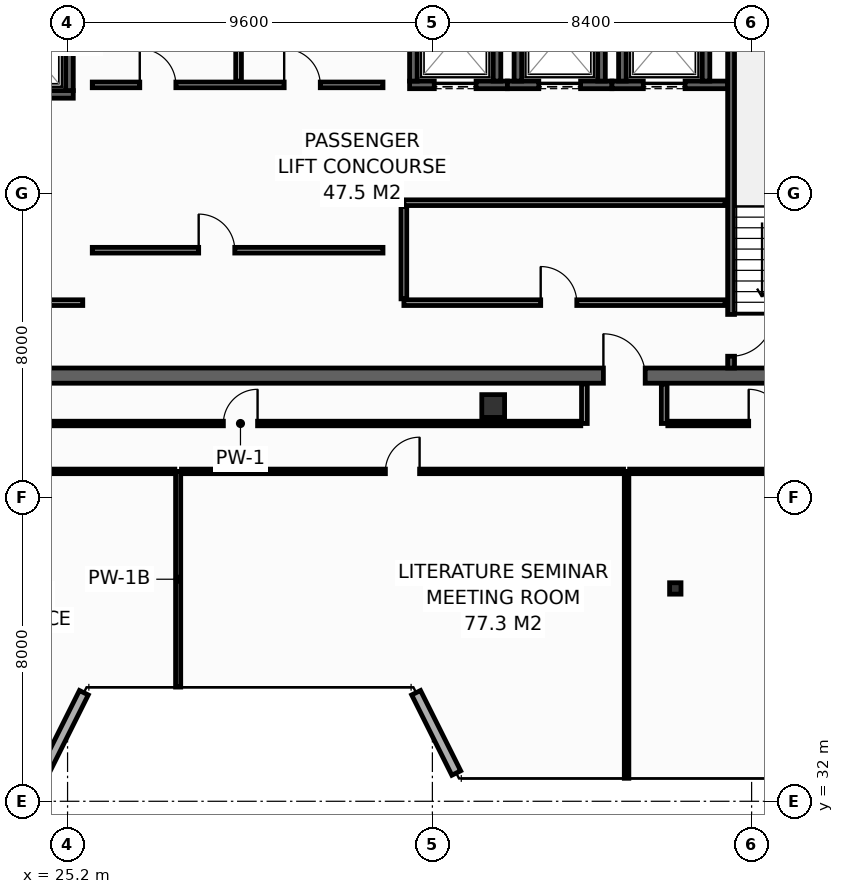
"""IFC4 building model, lengths in metres.
Left out: names, types, materials, properties, quantities, classifications, styles, units other than length and angle.
Written with IfcOpenShell. Run it as: python <this file> out.ifc"""

import sys

from ifc_helpers import new_model, si_unit, direction, frame, frame_2d, origin, origin_2d, place, context, subcontext, project, spatial, rectangle, hollow_rectangle, extrude, element, fill, save


model = new_model("IFC4")
c1 = context("Model", 3, precision=1e-05, world=origin(), true_north=direction((0.0, 1.0)))
c2 = subcontext(c1, "Body", "Model", "MODEL_VIEW")
j1 = project(units=[si_unit("LENGTHUNIT", "METRE"), si_unit("PLANEANGLEUNIT", "RADIAN")], contexts=[c1])
p1 = place(None, origin())
s1 = spatial("IfcSite", under=j1, at=p1, CompositionType="ELEMENT")
p2 = place(p1, origin())
s2 = spatial("IfcBuilding", under=s1, at=p2, CompositionType="ELEMENT")
p3 = place(p2, frame((0.0, 0.0, 302.8)))
s3 = spatial("IfcBuildingStorey", under=s2, at=p3, CompositionType="ELEMENT", Elevation=302.8)
p4 = place(p3, frame((13.7, 43.2, 0.0), z_axis=(0.0, 0.0, 1.0), x_axis=(1.0, 0.0, 0.0)))
e1 = element("IfcWall", 1, at=p4, inside=s3, PredefinedType="SHEAR", context=c2, shape_type="SweptSolid", body=[
    extrude(rectangle(XDim=32.5, YDim=0.4, at=frame_2d((16.25, 0.0))), origin(), (0.0, 0.0, 1.0), 3.55),
])
p5 = place(p4, frame((5.4, 0.0, 0.0)))
e2 = element("IfcOpeningElement", 2, at=p5, cuts=e1, PredefinedType="OPENING", context=c2, shape_type="SweptSolid", body=[
    extrude(rectangle(XDim=1.1, YDim=2.15, at=frame_2d((0.55, 1.075))), frame((0.0, 0.21, 0.0), z_axis=(0.0, -1.0, 0.0), x_axis=(1.0, 0.0, 0.0)), (0.0, 0.0, 1.0), 0.42),
])
p6 = place(p4, frame((25.6, 0.0, 0.0)))
e3 = element("IfcOpeningElement", 3, at=p6, cuts=e1, PredefinedType="OPENING", context=c2, shape_type="SweptSolid", body=[
    extrude(rectangle(XDim=1.1, YDim=2.15, at=frame_2d((0.55, 1.075))), frame((0.0, 0.21, 0.0), z_axis=(0.0, -1.0, 0.0), x_axis=(1.0, 0.0, 0.0)), (0.0, 0.0, 1.0), 0.42),
])
p7 = place(p3, frame((36.4, 42.4, 0.0), z_axis=(0.0, 0.0, 1.0), x_axis=(1.0, 0.0, 0.0)))
e4 = element("IfcColumn", 4, at=p7, inside=s3, PredefinedType="COLUMN", context=c2, shape_type="SweptSolid", body=[
    extrude(hollow_rectangle(XDim=0.6, YDim=0.6, WallThickness=0.028, at=origin_2d()), origin(), (0.0, 0.0, 1.0), 3.8),
])
p8 = place(p3, frame((41.192, 37.6, 0.0), z_axis=(0.0, 0.0, 1.0), x_axis=(1.0, 0.0, 0.0)))
e5 = element("IfcColumn", 5, at=p8, inside=s3, PredefinedType="COLUMN", context=c2, shape_type="SweptSolid", body=[
    extrude(hollow_rectangle(XDim=0.3, YDim=0.3, WallThickness=0.012, at=origin_2d()), origin(), (0.0, 0.0, 1.0), 3.8),
])
p9 = place(p3, frame((22.5, 50.6, 0.0), z_axis=(0.0, 0.0, 1.0), x_axis=(1.0, 0.0, 0.0)))
e6 = element("IfcWall", 6, at=p9, inside=s3, PredefinedType="SHEAR", context=c2, shape_type="SweptSolid", body=[
    extrude(rectangle(XDim=2.85, YDim=0.2, at=frame_2d((1.425, 0.0))), origin(), (0.0, 0.0, 1.0), 3.55),
])
p10 = place(p9, frame((0.925, 0.0, 0.0)))
e7 = element("IfcOpeningElement", 7, at=p10, cuts=e6, PredefinedType="OPENING", context=c2, shape_type="SweptSolid", body=[
    extrude(rectangle(XDim=1.25, YDim=2.3, at=frame_2d((0.625, 1.15))), frame((0.0, 0.11, 0.0), z_axis=(0.0, -1.0, 0.0), x_axis=(1.0, 0.0, 0.0)), (0.0, 0.0, 1.0), 0.22),
])
p11 = place(p3, frame((25.25, 50.7, 0.0), z_axis=(0.0, 0.0, 1.0), x_axis=(0.0, 1.0, 0.0)))
e8 = element("IfcWall", 8, at=p11, inside=s3, PredefinedType="SHEAR", context=c2, shape_type="SweptSolid", body=[
    extrude(rectangle(XDim=2.6, YDim=0.2, at=frame_2d((1.3, 0.0))), origin(), (0.0, 0.0, 1.0), 3.55),
])
p12 = place(p3, frame((34.2, 50.85, 0.0), z_axis=(0.0, 0.0, 1.0), x_axis=(1.0, 0.0, 0.0)))
e9 = element("IfcWall", 9, at=p12, inside=s3, PredefinedType="SHEAR", context=c2, shape_type="SweptSolid", body=[
    extrude(rectangle(XDim=2.575, YDim=0.2, at=frame_2d((1.288, 0.0))), origin(), (0.0, 0.0, 1.0), 3.55),
])
p13 = place(p12, frame((0.65, 0.0, 0.0)))
e10 = element("IfcOpeningElement", 10, at=p13, cuts=e9, PredefinedType="OPENING", context=c2, shape_type="SweptSolid", body=[
    extrude(rectangle(XDim=1.1, YDim=2.2, at=frame_2d((0.55, 1.1))), frame((0.0, 0.11, 0.0), z_axis=(0.0, -1.0, 0.0), x_axis=(1.0, 0.0, 0.0)), (0.0, 0.0, 1.0), 0.22),
])
for number, where, z_axis, x_axis in (
    (11, (34.3, 50.95, 0.0), (0.0, 0.0, 1.0), (0.0, 1.0, 0.0)),
    (12, (36.5, 50.95, 0.0), (0.0, 0.0, 1.0), (0.0, 1.0, 0.0)),
):
    element("IfcWall", number, at=place(p3, frame(where, z_axis=z_axis, x_axis=x_axis)), inside=s3, PredefinedType="SHEAR", context=c2, shape_type="SweptSolid", body=[
        extrude(rectangle(XDim=2.3, YDim=0.2, at=frame_2d((1.15, 0.0))), origin(), (0.0, 0.0, 1.0), 3.55),
    ])
p14 = place(p3, frame((36.775, 50.85, 0.0), z_axis=(0.0, 0.0, 1.0), x_axis=(1.0, 0.0, 0.0)))
e13 = element("IfcWall", 13, at=p14, inside=s3, PredefinedType="SHEAR", context=c2, shape_type="SweptSolid", body=[
    extrude(rectangle(XDim=2.75, YDim=0.2, at=frame_2d((1.375, 0.0))), origin(), (0.0, 0.0, 1.0), 3.55),
])
p15 = place(p14, frame((0.825, 0.0, 0.0)))
e14 = element("IfcOpeningElement", 14, at=p15, cuts=e13, PredefinedType="OPENING", context=c2, shape_type="SweptSolid", body=[
    extrude(rectangle(XDim=1.1, YDim=2.2, at=frame_2d((0.55, 1.1))), frame((0.0, 0.11, 0.0), z_axis=(0.0, -1.0, 0.0), x_axis=(1.0, 0.0, 0.0)), (0.0, 0.0, 1.0), 0.22),
])
for number, where, z_axis, x_axis in (
    (15, (37.05, 50.95, 0.0), (0.0, 0.0, 1.0), (0.0, 1.0, 0.0)),
    (16, (39.25, 50.95, 0.0), (0.0, 0.0, 1.0), (0.0, 1.0, 0.0)),
):
    element("IfcWall", number, at=place(p3, frame(where, z_axis=z_axis, x_axis=x_axis)), inside=s3, PredefinedType="SHEAR", context=c2, shape_type="SweptSolid", body=[
        extrude(rectangle(XDim=2.3, YDim=0.2, at=frame_2d((1.15, 0.0))), origin(), (0.0, 0.0, 1.0), 3.55),
    ])
p16 = place(p3, frame((39.525, 50.85, 0.0), z_axis=(0.0, 0.0, 1.0), x_axis=(1.0, 0.0, 0.0)))
e17 = element("IfcWall", 17, at=p16, inside=s3, PredefinedType="SHEAR", context=c2, shape_type="SweptSolid", body=[
    extrude(rectangle(XDim=3.045, YDim=0.2, at=frame_2d((1.522, 0.0))), origin(), (0.0, 0.0, 1.0), 3.55),
])
p17 = place(p16, frame((0.825, 0.0, 0.0)))
e18 = element("IfcOpeningElement", 18, at=p17, cuts=e17, PredefinedType="OPENING", context=c2, shape_type="SweptSolid", body=[
    extrude(rectangle(XDim=1.1, YDim=2.2, at=frame_2d((0.55, 1.1))), frame((0.0, 0.11, 0.0), z_axis=(0.0, -1.0, 0.0), x_axis=(1.0, 0.0, 0.0)), (0.0, 0.0, 1.0), 0.22),
])
for number, where, z_axis, x_axis in (
    (19, (39.8, 50.95, 0.0), (0.0, 0.0, 1.0), (0.0, 1.0, 0.0)),
    (20, (42.0, 50.95, 0.0), (0.0, 0.0, 1.0), (0.0, 1.0, 0.0)),
):
    element("IfcWall", number, at=place(p3, frame(where, z_axis=z_axis, x_axis=x_axis)), inside=s3, PredefinedType="SHEAR", context=c2, shape_type="SweptSolid", body=[
        extrude(rectangle(XDim=2.3, YDim=0.2, at=frame_2d((1.15, 0.0))), origin(), (0.0, 0.0, 1.0), 3.55),
    ])
p18 = place(p3, frame((42.66, 53.8, 0.0), z_axis=(0.0, 0.0, 1.0), x_axis=(0.0, -1.0, 0.0)))
e21 = element("IfcWall", 21, at=p18, inside=s3, PredefinedType="SHEAR", context=c2, shape_type="SweptSolid", body=[
    extrude(rectangle(XDim=10.4, YDim=0.18, at=frame_2d((5.2, 0.0))), origin(), (0.0, 0.0, 1.0), 3.55),
])
p19 = place(p18, frame((8.99, 0.0, 0.0)))
e22 = element("IfcOpeningElement", 22, at=p19, cuts=e21, PredefinedType="OPENING", context=c2, shape_type="SweptSolid", body=[
    extrude(rectangle(XDim=1.1, YDim=2.15, at=frame_2d((0.55, 1.075))), frame((0.0, 0.1, 0.0), z_axis=(0.0, -1.0, 0.0), x_axis=(1.0, 0.0, 0.0)), (0.0, 0.0, 1.0), 0.2),
])
p20 = place(p3, frame((22.68, 45.12, 0.0), z_axis=(0.0, 0.0, 1.0), x_axis=(1.0, 0.0, 0.0)))
e23 = element("IfcWall", 23, at=p20, inside=s3, PredefinedType="PARTITIONING", context=c2, shape_type="SweptSolid", body=[
    extrude(rectangle(XDim=2.92, YDim=0.15, at=frame_2d((1.46, 0.0))), origin(), (0.0, 0.0, 1.0), 3.55),
])
p21 = place(p20, frame((0.85, 0.0, 0.0)))
e24 = element("IfcOpeningElement", 24, at=p21, cuts=e23, PredefinedType="OPENING", context=c2, shape_type="SweptSolid", body=[
    extrude(rectangle(XDim=1.1, YDim=2.15, at=frame_2d((0.55, 1.075))), frame((0.0, 0.085, 0.0), z_axis=(0.0, -1.0, 0.0), x_axis=(1.0, 0.0, 0.0)), (0.0, 0.0, 1.0), 0.17),
])
p22 = place(p3, frame((34.05, 45.12, 0.0), z_axis=(0.0, 0.0, 1.0), x_axis=(1.0, 0.0, 0.0)))
e25 = element("IfcWall", 25, at=p22, inside=s3, PredefinedType="PARTITIONING", context=c2, shape_type="SweptSolid", body=[
    extrude(rectangle(XDim=8.45, YDim=0.15, at=frame_2d((4.225, 0.0))), origin(), (0.0, 0.0, 1.0), 3.55),
])
p23 = place(p22, frame((3.6, 0.0, 0.0)))
e26 = element("IfcOpeningElement", 26, at=p23, cuts=e25, PredefinedType="OPENING", context=c2, shape_type="SweptSolid", body=[
    extrude(rectangle(XDim=0.95, YDim=2.15, at=frame_2d((0.475, 1.075))), frame((0.0, 0.085, 0.0), z_axis=(0.0, -1.0, 0.0), x_axis=(1.0, 0.0, 0.0)), (0.0, 0.0, 1.0), 0.17),
])
p24 = place(p3, frame((34.05, 47.75, 0.0), z_axis=(0.0, 0.0, 1.0), x_axis=(1.0, 0.0, 0.0)))
e27 = element("IfcWall", 27, at=p24, inside=s3, PredefinedType="PARTITIONING", context=c2, shape_type="SweptSolid", body=[
    extrude(rectangle(XDim=8.45, YDim=0.15, at=frame_2d((4.225, 0.0))), origin(), (0.0, 0.0, 1.0), 3.55),
])
p25 = place(p3, frame((34.05, 45.22, 0.0), z_axis=(0.0, 0.0, 1.0), x_axis=(0.0, 1.0, 0.0)))
e28 = element("IfcWall", 28, at=p25, inside=s3, PredefinedType="PARTITIONING", context=c2, shape_type="SweptSolid", body=[
    extrude(rectangle(XDim=2.43, YDim=0.15, at=frame_2d((1.215, 0.0))), origin(), (0.0, 0.0, 1.0), 3.55),
])
p26 = place(p3, frame((25.85, 50.85, 0.0), z_axis=(0.0, 0.0, 1.0), x_axis=(1.0, 0.0, 0.0)))
e29 = element("IfcWall", 29, at=p26, inside=s3, PredefinedType="PARTITIONING", context=c2, shape_type="SweptSolid", body=[
    extrude(rectangle(XDim=7.65, YDim=0.15, at=frame_2d((3.825, 0.0))), origin(), (0.0, 0.0, 1.0), 3.55),
])
p27 = place(p26, frame((1.25, 0.0, 0.0)))
e30 = element("IfcOpeningElement", 30, at=p27, cuts=e29, PredefinedType="OPENING", context=c2, shape_type="SweptSolid", body=[
    extrude(rectangle(XDim=0.95, YDim=2.15, at=frame_2d((0.475, 1.075))), frame((0.0, 0.085, 0.0), z_axis=(0.0, -1.0, 0.0), x_axis=(1.0, 0.0, 0.0)), (0.0, 0.0, 1.0), 0.17),
])
p28 = place(p26, frame((5.05, 0.0, 0.0)))
e31 = element("IfcOpeningElement", 31, at=p28, cuts=e29, PredefinedType="OPENING", context=c2, shape_type="SweptSolid", body=[
    extrude(rectangle(XDim=0.95, YDim=2.15, at=frame_2d((0.475, 1.075))), frame((0.0, 0.085, 0.0), z_axis=(0.0, -1.0, 0.0), x_axis=(1.0, 0.0, 0.0)), (0.0, 0.0, 1.0), 0.17),
])
p29 = place(p3, frame((29.7, 50.95, 0.0), z_axis=(0.0, 0.0, 1.0), x_axis=(0.0, 1.0, 0.0)))
e32 = element("IfcWall", 32, at=p29, inside=s3, PredefinedType="PARTITIONING", context=c2, shape_type="SweptSolid", body=[
    extrude(rectangle(XDim=2.7, YDim=0.15, at=frame_2d((1.35, 0.0))), origin(), (0.0, 0.0, 1.0), 3.55),
])
p30 = place(p3, frame((25.85, 46.5, 0.0), z_axis=(0.0, 0.0, 1.0), x_axis=(1.0, 0.0, 0.0)))
e33 = element("IfcWall", 33, at=p30, inside=s3, PredefinedType="PARTITIONING", context=c2, shape_type="SweptSolid", body=[
    extrude(rectangle(XDim=7.65, YDim=0.15, at=frame_2d((3.825, 0.0))), origin(), (0.0, 0.0, 1.0), 3.55),
])
p31 = place(p30, frame((2.8, 0.0, 0.0)))
e34 = element("IfcOpeningElement", 34, at=p31, cuts=e33, PredefinedType="OPENING", context=c2, shape_type="SweptSolid", body=[
    extrude(rectangle(XDim=0.95, YDim=2.15, at=frame_2d((0.475, 1.075))), frame((0.0, 0.085, 0.0), z_axis=(0.0, -1.0, 0.0), x_axis=(1.0, 0.0, 0.0)), (0.0, 0.0, 1.0), 0.17),
])
for number, where, z_axis, x_axis in (
    (35, (24.572, 32.743, 0.0), (0.0, 0.0, 1.0), (0.447, 0.894, 0.0)),
    (36, (34.372, 34.857, 0.0), (0.0, 0.0, 1.0), (0.447, -0.894, 0.0)),
):
    element("IfcWall", number, at=place(p3, frame(where, z_axis=z_axis, x_axis=x_axis)), inside=s3, PredefinedType="STANDARD", context=c2, shape_type="SweptSolid", body=[
        extrude(rectangle(XDim=2.363, YDim=0.26, at=frame_2d((1.182, 0.0))), origin(), (0.0, 0.0, 1.0), 3.55),
    ])
for number, where, z_axis, x_axis in (
    (37, (38.8, 41.94, 0.0), (0.0, 0.0, 1.0), (0.0, 1.0, 0.0)),
    (38, (40.9, 41.94, 0.0), (0.0, 0.0, 1.0), (0.0, 1.0, 0.0)),
):
    element("IfcWall", number, at=place(p3, frame(where, z_axis=z_axis, x_axis=x_axis)), inside=s3, PredefinedType="PARTITIONING", context=c2, shape_type="SweptSolid", body=[
        extrude(rectangle(XDim=1.04, YDim=0.15, at=frame_2d((0.52, 0.0))), origin(), (0.0, 0.0, 1.0), 3.55),
    ])
p32 = place(p3, frame((20.795, 41.94, 0.0), z_axis=(0.0, 0.0, 1.0), x_axis=(1.0, 0.0, 0.0)))
e39 = element("IfcWall", 39, at=p32, inside=s3, PredefinedType="PARTITIONING", context=c2, shape_type="SweptSolid", body=[
    extrude(rectangle(XDim=17.91, YDim=0.12, at=frame_2d((8.955, 0.0))), origin(), (0.0, 0.0, 1.0), 3.047),
])
p33 = place(p32, frame((8.505, 0.0, 0.0)))
e40 = element("IfcOpeningElement", 40, at=p33, cuts=e39, PredefinedType="OPENING", context=c2, shape_type="SweptSolid", body=[
    extrude(rectangle(XDim=0.9, YDim=2.1, at=frame_2d((0.45, 1.05))), frame((0.0, 0.07, 0.0), z_axis=(0.0, -1.0, 0.0), x_axis=(1.0, 0.0, 0.0)), (0.0, 0.0, 1.0), 0.14),
])
p34 = place(p3, frame((40.995, 41.94, 0.0), z_axis=(0.0, 0.0, 1.0), x_axis=(1.0, 0.0, 0.0)))
e41 = element("IfcWall", 41, at=p34, inside=s3, PredefinedType="PARTITIONING", context=c2, shape_type="SweptSolid", body=[
    extrude(rectangle(XDim=5.155, YDim=0.12, at=frame_2d((2.577, 0.0))), origin(), (0.0, 0.0, 1.0), 3.55),
])
p35 = place(p34, frame((2.128, 0.0, 0.0)))
e42 = element("IfcOpeningElement", 42, at=p35, cuts=e41, PredefinedType="OPENING", context=c2, shape_type="SweptSolid", body=[
    extrude(rectangle(XDim=0.9, YDim=2.1, at=frame_2d((0.45, 1.05))), frame((0.0, 0.07, 0.0), z_axis=(0.0, -1.0, 0.0), x_axis=(1.0, 0.0, 0.0)), (0.0, 0.0, 1.0), 0.14),
])
p36 = place(p3, frame((28.11, 35.005, 0.0), z_axis=(0.0, 0.0, 1.0), x_axis=(0.0, 1.0, 0.0)))
e43 = element("IfcWall", 43, at=p36, inside=s3, PredefinedType="PARTITIONING", context=c2, shape_type="SweptSolid", body=[
    extrude(rectangle(XDim=5.675, YDim=0.135, at=frame_2d((2.837, 0.0))), origin(), (0.0, 0.0, 1.0), 3.55),
])
p37 = place(p3, frame((39.91, 32.605, 0.0), z_axis=(0.0, 0.0, 1.0), x_axis=(0.0, 1.0, 0.0)))
e44 = element("IfcWall", 44, at=p37, inside=s3, PredefinedType="PARTITIONING", context=c2, shape_type="SweptSolid", body=[
    extrude(rectangle(XDim=8.075, YDim=0.12, at=frame_2d((4.038, 0.0))), origin(), (0.0, 0.0, 1.0), 3.047),
])
p38 = place(p3, frame((16.4, 40.68, 0.0), z_axis=(0.0, 0.0, 1.0), x_axis=(1.0, 0.0, 0.0)))
e45 = element("IfcWall", 45, at=p38, inside=s3, PredefinedType="PARTITIONING", context=c2, shape_type="SweptSolid", body=[
    extrude(rectangle(XDim=11.623, YDim=0.12, at=frame_2d((5.811, 0.0))), origin(), (0.0, 0.0, 1.0), 3.047),
])
p39 = place(p38, frame((5.361, 0.0, 0.0)))
e46 = element("IfcOpeningElement", 46, at=p39, cuts=e45, PredefinedType="OPENING", context=c2, shape_type="SweptSolid", body=[
    extrude(rectangle(XDim=0.9, YDim=2.1, at=frame_2d((0.45, 1.05))), frame((0.0, 0.07, 0.0), z_axis=(0.0, -1.0, 0.0), x_axis=(1.0, 0.0, 0.0)), (0.0, 0.0, 1.0), 0.14),
])
p40 = place(p3, frame((28.198, 40.68, 0.0), z_axis=(0.0, 0.0, 1.0), x_axis=(1.0, 0.0, 0.0)))
e47 = element("IfcWall", 47, at=p40, inside=s3, PredefinedType="PARTITIONING", context=c2, shape_type="SweptSolid", body=[
    extrude(rectangle(XDim=11.633, YDim=0.12, at=frame_2d((5.816, 0.0))), origin(), (0.0, 0.0, 1.0), 3.047),
])
p41 = place(p40, frame((5.366, 0.0, 0.0)))
e48 = element("IfcOpeningElement", 48, at=p41, cuts=e47, PredefinedType="OPENING", context=c2, shape_type="SweptSolid", body=[
    extrude(rectangle(XDim=0.9, YDim=2.1, at=frame_2d((0.45, 1.05))), frame((0.0, 0.07, 0.0), z_axis=(0.0, -1.0, 0.0), x_axis=(1.0, 0.0, 0.0)), (0.0, 0.0, 1.0), 0.14),
])
p42 = place(p3, frame((39.99, 40.68, 0.0), z_axis=(0.0, 0.0, 1.0), x_axis=(1.0, 0.0, 0.0)))
e49 = element("IfcWall", 49, at=p42, inside=s3, PredefinedType="PARTITIONING", context=c2, shape_type="SweptSolid", body=[
    extrude(rectangle(XDim=13.595, YDim=0.12, at=frame_2d((6.798, 0.0))), origin(), (0.0, 0.0, 1.0), 3.085),
])
p43 = place(p42, frame((6.348, 0.0, 0.0)))
e50 = element("IfcOpeningElement", 50, at=p43, cuts=e49, PredefinedType="OPENING", context=c2, shape_type="SweptSolid", body=[
    extrude(rectangle(XDim=0.9, YDim=2.1, at=frame_2d((0.45, 1.05))), frame((0.0, 0.07, 0.0), z_axis=(0.0, -1.0, 0.0), x_axis=(1.0, 0.0, 0.0)), (0.0, 0.0, 1.0), 0.14),
])
p44 = place(p13, origin())
e51 = element("IfcDoor", 51, at=p44, inside=s3, OperationType="SLIDING_TO_LEFT", PredefinedType="DOOR", context=c2, shape_type="SweptSolid", body=[
    extrude(rectangle(XDim=1.1, YDim=2.2, at=frame_2d((0.55, 1.1))), frame((0.0, 0.025, 0.0), z_axis=(0.0, -1.0, 0.0), x_axis=(1.0, 0.0, 0.0)), (0.0, 0.0, 1.0), 0.05),
])
fill(e10, e51)
p45 = place(p15, origin())
e52 = element("IfcDoor", 52, at=p45, inside=s3, OperationType="SLIDING_TO_LEFT", PredefinedType="DOOR", context=c2, shape_type="SweptSolid", body=[
    extrude(rectangle(XDim=1.1, YDim=2.2, at=frame_2d((0.55, 1.1))), frame((0.0, 0.025, 0.0), z_axis=(0.0, -1.0, 0.0), x_axis=(1.0, 0.0, 0.0)), (0.0, 0.0, 1.0), 0.05),
])
fill(e14, e52)
p46 = place(p17, origin())
e53 = element("IfcDoor", 53, at=p46, inside=s3, OperationType="SLIDING_TO_LEFT", PredefinedType="DOOR", context=c2, shape_type="SweptSolid", body=[
    extrude(rectangle(XDim=1.1, YDim=2.2, at=frame_2d((0.55, 1.1))), frame((0.0, 0.025, 0.0), z_axis=(0.0, -1.0, 0.0), x_axis=(1.0, 0.0, 0.0)), (0.0, 0.0, 1.0), 0.05),
])
fill(e18, e53)
p47 = place(p19, origin())
e54 = element("IfcDoor", 54, at=p47, inside=s3, OperationType="SINGLE_SWING_LEFT", PredefinedType="DOOR", context=c2, shape_type="SweptSolid", body=[
    extrude(rectangle(XDim=1.1, YDim=2.15, at=frame_2d((0.55, 1.075))), frame((0.0, 0.025, 0.0), z_axis=(0.0, -1.0, 0.0), x_axis=(1.0, 0.0, 0.0)), (0.0, 0.0, 1.0), 0.05),
])
fill(e22, e54)
p48 = place(p6, origin())
e55 = element("IfcDoor", 55, at=p48, inside=s3, OperationType="SINGLE_SWING_LEFT", PredefinedType="DOOR", context=c2, shape_type="SweptSolid", body=[
    extrude(rectangle(XDim=1.1, YDim=2.15, at=frame_2d((0.55, 1.075))), frame((0.0, 0.025, 0.0), z_axis=(0.0, -1.0, 0.0), x_axis=(1.0, 0.0, 0.0)), (0.0, 0.0, 1.0), 0.05),
])
fill(e3, e55)
p49 = place(p23, origin())
e56 = element("IfcDoor", 56, at=p49, inside=s3, OperationType="SINGLE_SWING_LEFT", PredefinedType="DOOR", context=c2, shape_type="SweptSolid", body=[
    extrude(rectangle(XDim=0.95, YDim=2.15, at=frame_2d((0.475, 1.075))), frame((0.0, 0.025, 0.0), z_axis=(0.0, -1.0, 0.0), x_axis=(1.0, 0.0, 0.0)), (0.0, 0.0, 1.0), 0.05),
])
fill(e26, e56)
p50 = place(p27, origin())
e57 = element("IfcDoor", 57, at=p50, inside=s3, OperationType="SINGLE_SWING_LEFT", PredefinedType="DOOR", context=c2, shape_type="SweptSolid", body=[
    extrude(rectangle(XDim=0.95, YDim=2.15, at=frame_2d((0.475, 1.075))), frame((0.0, 0.025, 0.0), z_axis=(0.0, -1.0, 0.0), x_axis=(1.0, 0.0, 0.0)), (0.0, 0.0, 1.0), 0.05),
])
fill(e30, e57)
p51 = place(p28, origin())
e58 = element("IfcDoor", 58, at=p51, inside=s3, OperationType="SINGLE_SWING_LEFT", PredefinedType="DOOR", context=c2, shape_type="SweptSolid", body=[
    extrude(rectangle(XDim=0.95, YDim=2.15, at=frame_2d((0.475, 1.075))), frame((0.0, 0.025, 0.0), z_axis=(0.0, -1.0, 0.0), x_axis=(1.0, 0.0, 0.0)), (0.0, 0.0, 1.0), 0.05),
])
fill(e31, e58)
p52 = place(p31, origin())
e59 = element("IfcDoor", 59, at=p52, inside=s3, OperationType="SINGLE_SWING_LEFT", PredefinedType="DOOR", context=c2, shape_type="SweptSolid", body=[
    extrude(rectangle(XDim=0.95, YDim=2.15, at=frame_2d((0.475, 1.075))), frame((0.0, 0.025, 0.0), z_axis=(0.0, -1.0, 0.0), x_axis=(1.0, 0.0, 0.0)), (0.0, 0.0, 1.0), 0.05),
])
fill(e34, e59)
p53 = place(p33, origin())
e60 = element("IfcDoor", 60, at=p53, inside=s3, OperationType="SINGLE_SWING_RIGHT", PredefinedType="DOOR", context=c2, shape_type="SweptSolid", body=[
    extrude(rectangle(XDim=0.9, YDim=2.1, at=frame_2d((0.45, 1.05))), frame((0.0, 0.025, 0.0), z_axis=(0.0, -1.0, 0.0), x_axis=(1.0, 0.0, 0.0)), (0.0, 0.0, 1.0), 0.05),
])
fill(e40, e60)
p54 = place(p35, origin())
e61 = element("IfcDoor", 61, at=p54, inside=s3, OperationType="SINGLE_SWING_LEFT", PredefinedType="DOOR", context=c2, shape_type="SweptSolid", body=[
    extrude(rectangle(XDim=0.9, YDim=2.1, at=frame_2d((0.45, 1.05))), frame((0.0, 0.025, 0.0), z_axis=(0.0, -1.0, 0.0), x_axis=(1.0, 0.0, 0.0)), (0.0, 0.0, 1.0), 0.05),
])
fill(e42, e61)
p55 = place(p41, origin())
e62 = element("IfcDoor", 62, at=p55, inside=s3, OperationType="SINGLE_SWING_RIGHT", PredefinedType="DOOR", context=c2, shape_type="SweptSolid", body=[
    extrude(rectangle(XDim=0.9, YDim=2.1, at=frame_2d((0.45, 1.05))), frame((0.0, 0.025, 0.0), z_axis=(0.0, -1.0, 0.0), x_axis=(1.0, 0.0, 0.0)), (0.0, 0.0, 1.0), 0.05),
])
fill(e48, e62)
save(model, sys.argv[1])
